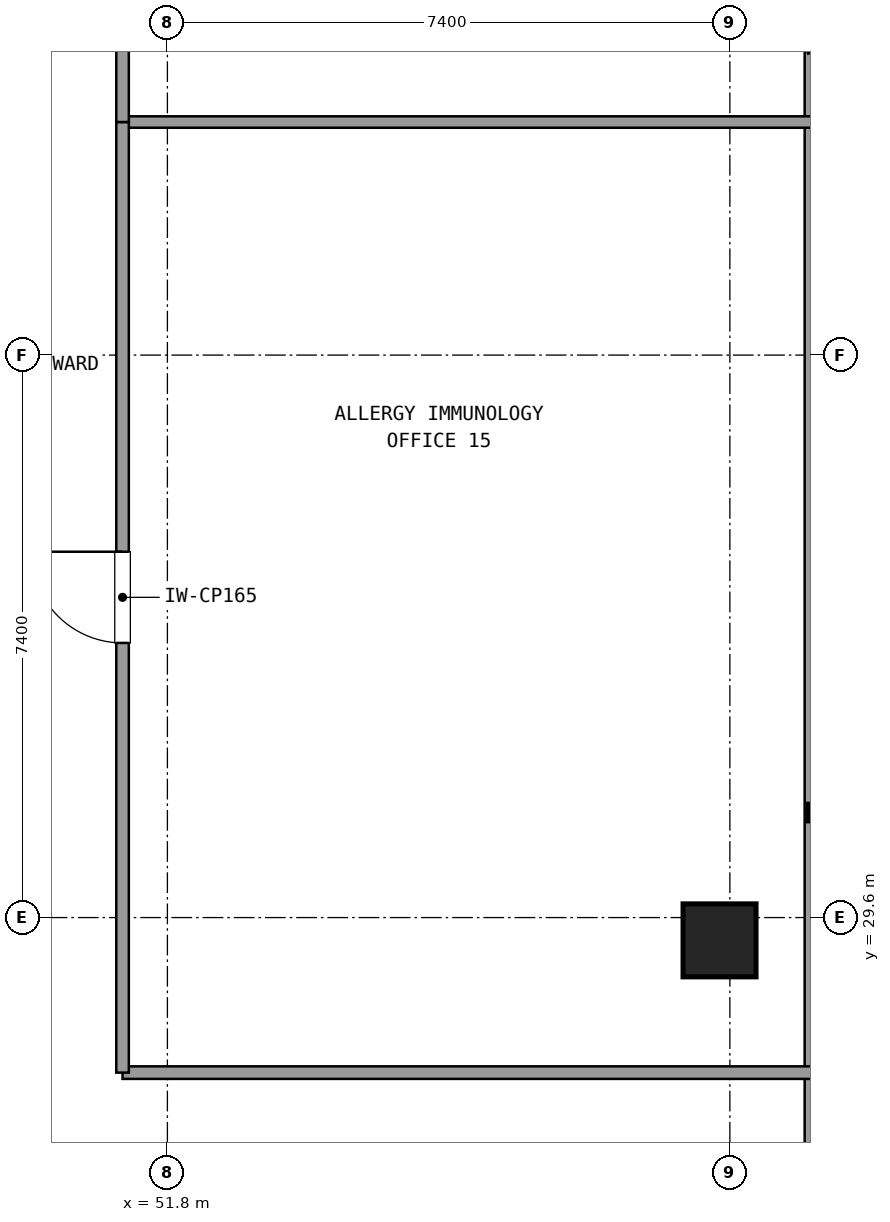
"""IFC4 building model, lengths in metres.
Left out: names, types, materials, properties, quantities, classifications, styles, units other than length and angle.
Written with IfcOpenShell. Run it as: python <this file> out.ifc"""

import sys

from ifc_helpers import new_model, si_unit, direction, frame, frame_2d, origin, origin_2d, place, context, subcontext, project, spatial, rectangle, extrude, element, fill, save


model = new_model("IFC4")
c1 = context("Model", 3, precision=1e-05, world=origin(), true_north=direction((0.0, 1.0)))
c2 = subcontext(c1, "Body", "Model", "MODEL_VIEW")
j1 = project(units=[si_unit("LENGTHUNIT", "METRE"), si_unit("PLANEANGLEUNIT", "RADIAN")], contexts=[c1])
p1 = place(None, origin())
s1 = spatial("IfcSite", under=j1, at=p1, CompositionType="ELEMENT")
p2 = place(p1, origin())
s2 = spatial("IfcBuilding", under=s1, at=p2, CompositionType="ELEMENT")
p3 = place(p2, frame((0.0, 0.0, 149.22)))
s3 = spatial("IfcBuildingStorey", under=s2, at=p3, CompositionType="ELEMENT", Elevation=149.22)
p4 = place(p3, frame((59.064, 29.3, 0.0), z_axis=(0.0, 0.0, 1.0), x_axis=(1.0, 0.0, 0.0)))
e1 = element("IfcColumn", 1, at=p4, inside=s3, PredefinedType="COLUMN", context=c2, shape_type="SweptSolid", body=[
    extrude(rectangle(XDim=0.96, YDim=0.96, at=origin_2d()), origin(), (0.0, 0.0, 1.0), 3.6),
])
p5 = place(p3, frame((60.304, 10.655, 0.0), z_axis=(0.0, 0.0, 1.0), x_axis=(0.0, 1.0, 0.0)))
e2 = element("IfcWall", 2, at=p5, inside=s3, PredefinedType="SOLIDWALL", context=c2, shape_type="SweptSolid", body=[
    extrude(rectangle(XDim=30.49, YDim=0.24, at=frame_2d((15.245, 0.0))), origin(), (0.0, 0.0, 1.0), 0.85),
])
p6 = place(p3, frame((51.21, 27.56, 0.0), z_axis=(0.0, 0.0, 1.0), x_axis=(1.0, 0.0, 0.0)))
e3 = element("IfcWall", 3, at=p6, inside=s3, PredefinedType="PARTITIONING", context=c2, shape_type="SweptSolid", body=[
    extrude(rectangle(XDim=9.074, YDim=0.165, at=frame_2d((4.537, 0.0))), origin(), (0.0, 0.0, 1.0), 2.61),
])
p7 = place(p3, frame((51.21, 40.066, 0.0), z_axis=(0.0, 0.0, 1.0), x_axis=(1.0, 0.0, 0.0)))
e4 = element("IfcWall", 4, at=p7, inside=s3, PredefinedType="PARTITIONING", context=c2, shape_type="SweptSolid", body=[
    extrude(rectangle(XDim=9.074, YDim=0.15, at=frame_2d((4.537, 0.0))), origin(), (0.0, 0.0, 1.0), 2.61),
])
p8 = place(p3, frame((51.21, 27.56, 0.0), z_axis=(0.0, 0.0, 1.0), x_axis=(0.0, 1.0, 0.0)))
e5 = element("IfcWall", 5, at=p8, inside=s3, PredefinedType="PARTITIONING", context=c2, shape_type="SweptSolid", body=[
    extrude(rectangle(XDim=12.506, YDim=0.165, at=frame_2d((6.253, 0.0))), origin(), (0.0, 0.0, 1.0), 2.61),
])
p9 = place(p8, frame((5.653, 0.0, 0.0)))
e6 = element("IfcOpeningElement", 6, at=p9, cuts=e5, PredefinedType="OPENING", context=c2, shape_type="SweptSolid", body=[
    extrude(rectangle(XDim=1.2, YDim=2.15, at=frame_2d((0.6, 1.075))), frame((0.0, 0.093, 0.0), z_axis=(0.0, -1.0, 0.0), x_axis=(1.0, 0.0, 0.0)), (0.0, 0.0, 1.0), 0.185),
])
p10 = place(p3, frame((51.21, 40.066, 0.0), z_axis=(0.0, 0.0, 1.0), x_axis=(0.0, 1.0, 0.0)))
e7 = element("IfcWall", 7, at=p10, inside=s3, PredefinedType="PARTITIONING", context=c2, shape_type="SweptSolid", body=[
    extrude(rectangle(XDim=7.034, YDim=0.165, at=frame_2d((3.517, 0.0))), origin(), (0.0, 0.0, 1.0), 2.61),
])
p11 = place(p10, frame((2.917, 0.0, 0.0)))
e8 = element("IfcOpeningElement", 8, at=p11, cuts=e7, PredefinedType="OPENING", context=c2, shape_type="SweptSolid", body=[
    extrude(rectangle(XDim=1.2, YDim=2.15, at=frame_2d((0.6, 1.075))), frame((0.0, 0.093, 0.0), z_axis=(0.0, -1.0, 0.0), x_axis=(1.0, 0.0, 0.0)), (0.0, 0.0, 1.0), 0.185),
])
p12 = place(p9, origin())
e9 = element("IfcDoor", 9, at=p12, inside=s3, OperationType="SINGLE_SWING_RIGHT", PredefinedType="DOOR", context=c2, shape_type="SweptSolid", body=[
    extrude(rectangle(XDim=1.2, YDim=2.15, at=frame_2d((0.6, 1.075))), frame((0.0, 0.025, 0.0), z_axis=(0.0, -1.0, 0.0), x_axis=(1.0, 0.0, 0.0)), (0.0, 0.0, 1.0), 0.05),
])
fill(e6, e9)
save(model, sys.argv[1])
